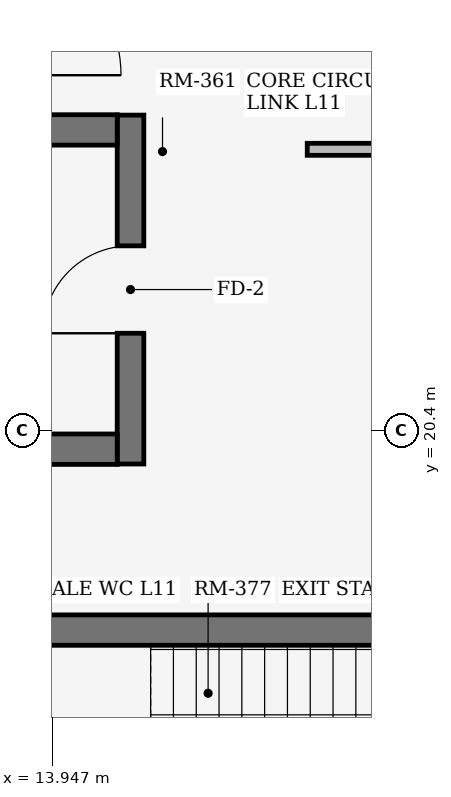
"""IFC4 building model, lengths in metres.
Left out: names, types, materials, properties, quantities, classifications, styles, units other than length and angle.
Written with IfcOpenShell. Run it as: python <this file> out.ifc"""

import sys

from ifc_helpers import new_model, si_unit, direction, frame, frame_2d, origin, place, context, subcontext, project, spatial, rectangle, extrude, element, fill, save


model = new_model("IFC4")
c1 = context("Model", 3, precision=1e-05, world=origin(), true_north=direction((0.0, 1.0)))
c2 = subcontext(c1, "Body", "Model", "MODEL_VIEW")
j1 = project(units=[si_unit("LENGTHUNIT", "METRE"), si_unit("PLANEANGLEUNIT", "RADIAN")], contexts=[c1])
p1 = place(None, origin())
s1 = spatial("IfcSite", under=j1, at=p1, CompositionType="ELEMENT")
p2 = place(p1, origin())
s2 = spatial("IfcBuilding", under=s1, at=p2, CompositionType="ELEMENT")
p3 = place(p2, frame((0.0, 0.0, 44.4)))
s3 = spatial("IfcBuildingStorey", under=s2, at=p3, CompositionType="ELEMENT", Elevation=44.4)
p4 = place(p3, frame((13.4, 17.775, 0.0), z_axis=(0.0, 0.0, 1.0), x_axis=(1.0, 0.0, 0.0)))
e1 = element("IfcWall", 1, at=p4, inside=s3, PredefinedType="SHEAR", context=c2, shape_type="SweptSolid", body=[
    extrude(rectangle(XDim=7.98, YDim=0.4, at=frame_2d((3.99, 0.0))), origin(), (0.0, 0.0, 1.0), 3.69),
])
p5 = place(p3, frame((14.975, 24.55, 0.0), z_axis=(0.0, 0.0, 1.0), x_axis=(0.0, -1.0, 0.0)))
e2 = element("IfcWall", 2, at=p5, inside=s3, PredefinedType="SHEAR", context=c2, shape_type="SweptSolid", body=[
    extrude(rectangle(XDim=4.59, YDim=0.35, at=frame_2d((2.295, 0.0))), origin(), (0.0, 0.0, 1.0), 3.69),
])
p6 = place(p5, frame((1.72, 0.0, 0.0)))
e3 = element("IfcOpeningElement", 3, at=p6, cuts=e2, PredefinedType="OPENING", context=c2, shape_type="SweptSolid", body=[
    extrude(rectangle(XDim=1.15, YDim=2.2, at=frame_2d((0.575, 1.1))), frame((0.0, 0.185, 0.0), z_axis=(0.0, -1.0, 0.0), x_axis=(1.0, 0.0, 0.0)), (0.0, 0.0, 1.0), 0.37),
])
for number, where, z_axis, x_axis in (
    (4, (14.8, 24.355, 0.0), (0.0, 0.0, 1.0), (-1.0, 0.0, 0.0)),
    (5, (14.8, 20.155, 0.0), (0.0, 0.0, 1.0), (-1.0, 0.0, 0.0)),
):
    element("IfcWall", number, at=place(p3, frame(where, z_axis=z_axis, x_axis=x_axis)), inside=s3, PredefinedType="SHEAR", context=c2, shape_type="SweptSolid", body=[
        extrude(rectangle(XDim=7.98, YDim=0.4, at=frame_2d((3.99, 0.0))), origin(), (0.0, 0.0, 1.0), 3.69),
    ])
p7 = place(p3, frame((17.3, 24.1, 0.0), z_axis=(0.0, 0.0, 1.0), x_axis=(1.0, 0.0, 0.0)))
e6 = element("IfcWall", 6, at=p7, inside=s3, PredefinedType="PARTITIONING", context=c2, shape_type="SweptSolid", body=[
    extrude(rectangle(XDim=7.05, YDim=0.158, at=frame_2d((3.525, 0.0))), origin(), (0.0, 0.0, 1.0), 3.67),
])
p8 = place(p7, frame((3.065, 0.0, 0.0)))
e7 = element("IfcOpeningElement", 7, at=p8, cuts=e6, PredefinedType="OPENING", context=c2, shape_type="SweptSolid", body=[
    extrude(rectangle(XDim=0.92, YDim=2.1, at=frame_2d((0.46, 1.05))), frame((0.0, 0.089, 0.0), z_axis=(0.0, -1.0, 0.0), x_axis=(1.0, 0.0, 0.0)), (0.0, 0.0, 1.0), 0.178),
])
p9 = place(p6, origin())
e8 = element("IfcDoor", 8, at=p9, inside=s3, OperationType="SINGLE_SWING_RIGHT", PredefinedType="DOOR", context=c2, shape_type="SweptSolid", body=[
    extrude(rectangle(XDim=1.15, YDim=2.2, at=frame_2d((0.575, 1.1))), frame((0.0, 0.025, 0.0), z_axis=(0.0, -1.0, 0.0), x_axis=(1.0, 0.0, 0.0)), (0.0, 0.0, 1.0), 0.05),
])
fill(e3, e8)
save(model, sys.argv[1])
